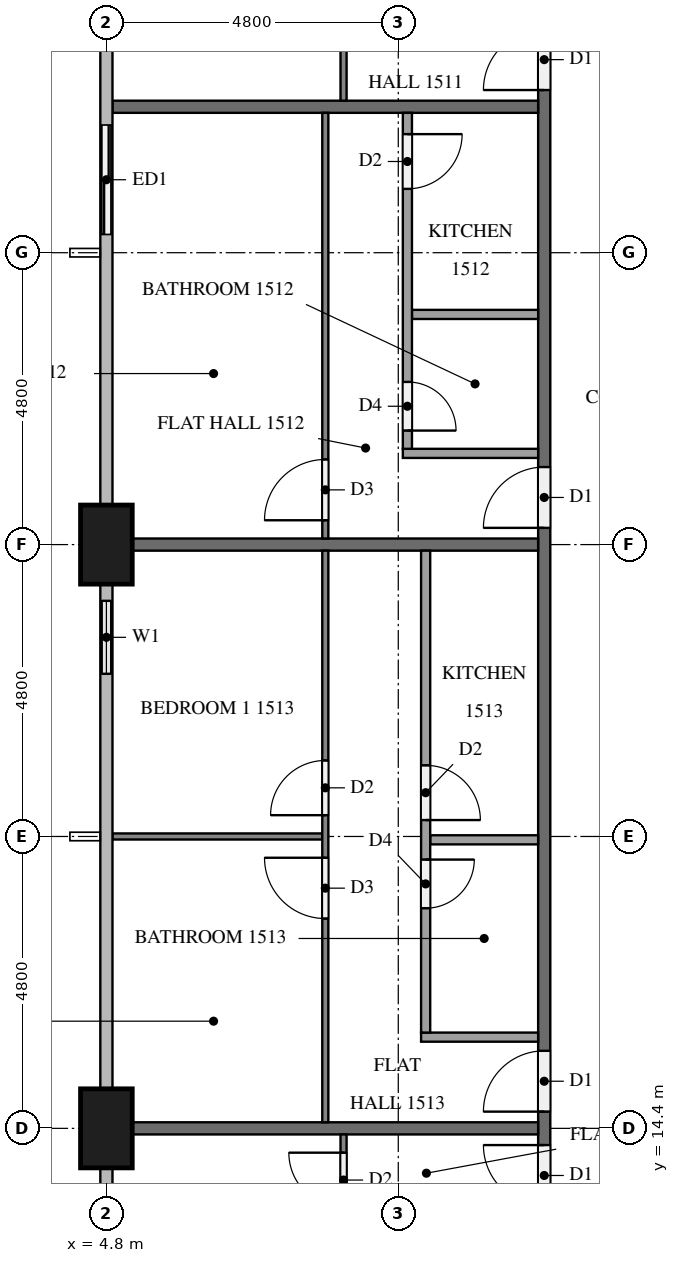
"""IFC4 building model, lengths in metres.
Left out: names, types, materials, properties, quantities, classifications, styles, units other than length and angle.
Written with IfcOpenShell. Run it as: python <this file> out.ifc"""

import sys

from ifc_helpers import new_model, si_unit, direction, frame, frame_2d, origin, origin_2d, place, context, subcontext, project, spatial, rectangle, extrude, element, fill, save


model = new_model("IFC4")
c1 = context("Model", 3, precision=1e-05, world=origin(), true_north=direction((0.0, 1.0)))
c2 = subcontext(c1, "Body", "Model", "MODEL_VIEW")
j1 = project(units=[si_unit("LENGTHUNIT", "METRE"), si_unit("PLANEANGLEUNIT", "RADIAN")], contexts=[c1])
p1 = place(None, origin())
s1 = spatial("IfcSite", under=j1, at=p1, CompositionType="ELEMENT")
p2 = place(p1, origin())
s2 = spatial("IfcBuilding", under=s1, at=p2, CompositionType="ELEMENT")
p3 = place(p2, frame((0.0, 0.0, 62.8)))
s3 = spatial("IfcBuildingStorey", under=s2, at=p3, CompositionType="ELEMENT", Elevation=62.8)
for number, where, z_axis, x_axis in (
    (1, (4.8, 24.0, 0.0), (0.0, 0.0, 1.0), (0.0, 1.0, 0.0)),
    (2, (4.8, 14.4, 0.0), (0.0, 0.0, 1.0), (0.0, 1.0, 0.0)),
):
    element("IfcColumn", number, at=place(p3, frame(where, z_axis=z_axis, x_axis=x_axis)), inside=s3, PredefinedType="COLUMN", context=c2, shape_type="SweptSolid", body=[
        extrude(rectangle(XDim=1.3, YDim=0.85, at=origin_2d()), origin(), (0.0, 0.0, 1.0), 3.2),
    ])
p4 = place(p3, frame((4.8, 31.2, 0.0), z_axis=(0.0, 0.0, 1.0), x_axis=(0.0, -1.0, 0.0)))
e3 = element("IfcWall", 3, at=p4, inside=s3, PredefinedType="SOLIDWALL", context=c2, shape_type="SweptSolid", body=[
    extrude(rectangle(XDim=2.4, YDim=0.15, at=frame_2d((1.2, 0.0))), origin(), (0.0, 0.0, 1.0), 3.2),
])
p5 = place(p4, frame((0.3, 0.0, 0.0)))
e4 = element("IfcOpeningElement", 4, at=p5, cuts=e3, PredefinedType="OPENING", context=c2, shape_type="SweptSolid", body=[
    extrude(rectangle(XDim=1.8, YDim=2.4, at=frame_2d((0.9, 1.2))), frame((0.0, 0.085, 0.0), z_axis=(0.0, -1.0, 0.0), x_axis=(1.0, 0.0, 0.0)), (0.0, 0.0, 1.0), 0.17),
])
p6 = place(p3, frame((4.8, 23.35, 0.0), z_axis=(0.0, 0.0, 1.0), x_axis=(0.0, -1.0, 0.0)))
e5 = element("IfcWall", 5, at=p6, inside=s3, PredefinedType="SOLIDWALL", context=c2, shape_type="SweptSolid", body=[
    extrude(rectangle(XDim=1.75, YDim=0.15, at=frame_2d((0.875, 0.0))), origin(), (0.0, 0.0, 1.0), 3.2),
])
p7 = place(p6, frame((0.275, 0.0, 0.9)))
e6 = element("IfcOpeningElement", 6, at=p7, cuts=e5, PredefinedType="OPENING", context=c2, shape_type="SweptSolid", body=[
    extrude(rectangle(XDim=1.2, YDim=1.4, at=frame_2d((0.6, 0.7))), frame((0.0, 0.085, 0.0), z_axis=(0.0, -1.0, 0.0), x_axis=(1.0, 0.0, 0.0)), (0.0, 0.0, 1.0), 0.17),
])
p8 = place(p3, frame((4.8, 13.75, 0.0), z_axis=(0.0, 0.0, 1.0), x_axis=(0.0, -1.0, 0.0)))
e7 = element("IfcWall", 7, at=p8, inside=s3, PredefinedType="SOLIDWALL", context=c2, shape_type="SweptSolid", body=[
    extrude(rectangle(XDim=1.75, YDim=0.15, at=frame_2d((0.875, 0.0))), origin(), (0.0, 0.0, 1.0), 3.2),
])
p9 = place(p8, frame((0.275, 0.0, 0.9)))
e8 = element("IfcOpeningElement", 8, at=p9, cuts=e7, PredefinedType="OPENING", context=c2, shape_type="SweptSolid", body=[
    extrude(rectangle(XDim=1.2, YDim=1.4, at=frame_2d((0.6, 0.7))), frame((0.0, 0.085, 0.0), z_axis=(0.0, -1.0, 0.0), x_axis=(1.0, 0.0, 0.0)), (0.0, 0.0, 1.0), 0.17),
])
p10 = place(p3, frame((12.0, 12.1, 0.0), z_axis=(0.0, 0.0, 1.0), x_axis=(0.0, 1.0, 0.0)))
e9 = element("IfcWall", 9, at=p10, inside=s3, PredefinedType="PARTITIONING", context=c2, shape_type="SweptSolid", body=[
    extrude(rectangle(XDim=28.6, YDim=0.2, at=frame_2d((14.3, 0.0))), origin(), (0.0, 0.0, 1.0), 3.2),
])
p11 = place(p10, frame((19.375, 0.0, 0.0)))
e10 = element("IfcOpeningElement", 10, at=p11, cuts=e9, PredefinedType="OPENING", context=c2, shape_type="SweptSolid", body=[
    extrude(rectangle(XDim=1.0, YDim=2.1, at=frame_2d((0.5, 1.05))), frame((0.0, 0.11, 0.0), z_axis=(0.0, -1.0, 0.0), x_axis=(1.0, 0.0, 0.0)), (0.0, 0.0, 1.0), 0.22),
])
p12 = place(p10, frame((12.175, 0.0, 0.0)))
e11 = element("IfcOpeningElement", 11, at=p12, cuts=e9, PredefinedType="OPENING", context=c2, shape_type="SweptSolid", body=[
    extrude(rectangle(XDim=1.0, YDim=2.1, at=frame_2d((0.5, 1.05))), frame((0.0, 0.11, 0.0), z_axis=(0.0, -1.0, 0.0), x_axis=(1.0, 0.0, 0.0)), (0.0, 0.0, 1.0), 0.22),
])
p13 = place(p10, frame((2.575, 0.0, 0.0)))
e12 = element("IfcOpeningElement", 12, at=p13, cuts=e9, PredefinedType="OPENING", context=c2, shape_type="SweptSolid", body=[
    extrude(rectangle(XDim=1.0, YDim=2.1, at=frame_2d((0.5, 1.05))), frame((0.0, 0.11, 0.0), z_axis=(0.0, -1.0, 0.0), x_axis=(1.0, 0.0, 0.0)), (0.0, 0.0, 1.0), 0.22),
])
p14 = place(p10, frame((1.025, 0.0, 0.0)))
e13 = element("IfcOpeningElement", 13, at=p14, cuts=e9, PredefinedType="OPENING", context=c2, shape_type="SweptSolid", body=[
    extrude(rectangle(XDim=1.0, YDim=2.1, at=frame_2d((0.5, 1.05))), frame((0.0, 0.11, 0.0), z_axis=(0.0, -1.0, 0.0), x_axis=(1.0, 0.0, 0.0)), (0.0, 0.0, 1.0), 0.22),
])
p15 = place(p3, frame((4.9, 31.2, 0.0), z_axis=(0.0, 0.0, 1.0), x_axis=(1.0, 0.0, 0.0)))
e14 = element("IfcWall", 14, at=p15, inside=s3, PredefinedType="PARTITIONING", context=c2, shape_type="SweptSolid", body=[
    extrude(rectangle(XDim=7.0, YDim=0.2, at=frame_2d((3.5, 0.0))), origin(), (0.0, 0.0, 1.0), 3.2),
])
for number, where, z_axis, x_axis in (
    (15, (5.225, 24.0, 0.0), (0.0, 0.0, 1.0), (1.0, 0.0, 0.0)),
    (16, (5.225, 14.4, 0.0), (0.0, 0.0, 1.0), (1.0, 0.0, 0.0)),
):
    element("IfcWall", number, at=place(p3, frame(where, z_axis=z_axis, x_axis=x_axis)), inside=s3, PredefinedType="PARTITIONING", context=c2, shape_type="SweptSolid", body=[
        extrude(rectangle(XDim=6.675, YDim=0.2, at=frame_2d((3.337, 0.0))), origin(), (0.0, 0.0, 1.0), 3.2),
    ])
p16 = place(p3, frame((8.7, 31.3, 0.0), z_axis=(0.0, 0.0, 1.0), x_axis=(0.0, 1.0, 0.0)))
e17 = element("IfcWall", 17, at=p16, inside=s3, PredefinedType="PARTITIONING", context=c2, shape_type="SweptSolid", body=[
    extrude(rectangle(XDim=9.4, YDim=0.1, at=frame_2d((4.7, 0.0))), origin(), (0.0, 0.0, 1.0), 3.2),
])
p17 = place(p16, frame((3.45, 0.0, 0.0)))
e18 = element("IfcOpeningElement", 18, at=p17, cuts=e17, PredefinedType="OPENING", context=c2, shape_type="SweptSolid", body=[
    extrude(rectangle(XDim=0.9, YDim=2.1, at=frame_2d((0.45, 1.05))), frame((0.0, 0.06, 0.0), z_axis=(0.0, -1.0, 0.0), x_axis=(1.0, 0.0, 0.0)), (0.0, 0.0, 1.0), 0.12),
])
p18 = place(p16, frame((5.05, 0.0, 0.0)))
e19 = element("IfcOpeningElement", 19, at=p18, cuts=e17, PredefinedType="OPENING", context=c2, shape_type="SweptSolid", body=[
    extrude(rectangle(XDim=1.0, YDim=2.1, at=frame_2d((0.5, 1.05))), frame((0.0, 0.06, 0.0), z_axis=(0.0, -1.0, 0.0), x_axis=(1.0, 0.0, 0.0)), (0.0, 0.0, 1.0), 0.12),
])
p19 = place(p3, frame((8.4, 24.1, 0.0), z_axis=(0.0, 0.0, 1.0), x_axis=(0.0, 1.0, 0.0)))
e20 = element("IfcWall", 20, at=p19, inside=s3, PredefinedType="PARTITIONING", context=c2, shape_type="SweptSolid", body=[
    extrude(rectangle(XDim=7.0, YDim=0.1, at=frame_2d((3.5, 0.0))), origin(), (0.0, 0.0, 1.0), 3.2),
])
p20 = place(p19, frame((0.3, 0.0, 0.0)))
e21 = element("IfcOpeningElement", 21, at=p20, cuts=e20, PredefinedType="OPENING", context=c2, shape_type="SweptSolid", body=[
    extrude(rectangle(XDim=1.0, YDim=2.1, at=frame_2d((0.5, 1.05))), frame((0.0, 0.06, 0.0), z_axis=(0.0, -1.0, 0.0), x_axis=(1.0, 0.0, 0.0)), (0.0, 0.0, 1.0), 0.12),
])
p21 = place(p3, frame((11.9, 27.785, 0.0), z_axis=(0.0, 0.0, 1.0), x_axis=(-1.0, 0.0, 0.0)))
e22 = element("IfcWall", 22, at=p21, inside=s3, PredefinedType="PARTITIONING", context=c2, shape_type="SweptSolid", body=[
    extrude(rectangle(XDim=2.075, YDim=0.15, at=frame_2d((1.038, 0.0))), origin(), (0.0, 0.0, 1.0), 3.2),
])
p22 = place(p3, frame((11.9, 25.5, 0.0), z_axis=(0.0, 0.0, 1.0), x_axis=(-1.0, 0.0, 0.0)))
e23 = element("IfcWall", 23, at=p22, inside=s3, PredefinedType="PARTITIONING", context=c2, shape_type="SweptSolid", body=[
    extrude(rectangle(XDim=2.225, YDim=0.15, at=frame_2d((1.112, 0.0))), origin(), (0.0, 0.0, 1.0), 3.2),
])
p23 = place(p3, frame((9.75, 31.1, 0.0), z_axis=(0.0, 0.0, 1.0), x_axis=(0.0, -1.0, 0.0)))
e24 = element("IfcWall", 24, at=p23, inside=s3, PredefinedType="PARTITIONING", context=c2, shape_type="SweptSolid", body=[
    extrude(rectangle(XDim=5.525, YDim=0.15, at=frame_2d((2.763, 0.0))), origin(), (0.0, 0.0, 1.0), 3.2),
])
p24 = place(p23, frame((4.425, 0.0, 0.0)))
e25 = element("IfcOpeningElement", 25, at=p24, cuts=e24, PredefinedType="OPENING", context=c2, shape_type="SweptSolid", body=[
    extrude(rectangle(XDim=0.8, YDim=2.1, at=frame_2d((0.4, 1.05))), frame((0.0, 0.085, 0.0), z_axis=(0.0, -1.0, 0.0), x_axis=(1.0, 0.0, 0.0)), (0.0, 0.0, 1.0), 0.17),
])
p25 = place(p23, frame((0.35, 0.0, 0.0)))
e26 = element("IfcOpeningElement", 26, at=p25, cuts=e24, PredefinedType="OPENING", context=c2, shape_type="SweptSolid", body=[
    extrude(rectangle(XDim=0.9, YDim=2.1, at=frame_2d((0.45, 1.05))), frame((0.0, 0.085, 0.0), z_axis=(0.0, -1.0, 0.0), x_axis=(1.0, 0.0, 0.0)), (0.0, 0.0, 1.0), 0.17),
])
p26 = place(p3, frame((8.35, 19.2, 0.0), z_axis=(0.0, 0.0, 1.0), x_axis=(-1.0, 0.0, 0.0)))
e27 = element("IfcWall", 27, at=p26, inside=s3, PredefinedType="PARTITIONING", context=c2, shape_type="SweptSolid", body=[
    extrude(rectangle(XDim=3.45, YDim=0.1, at=frame_2d((1.725, 0.0))), origin(), (0.0, 0.0, 1.0), 3.2),
])
p27 = place(p3, frame((8.4, 14.5, 0.0), z_axis=(0.0, 0.0, 1.0), x_axis=(0.0, 1.0, 0.0)))
e28 = element("IfcWall", 28, at=p27, inside=s3, PredefinedType="PARTITIONING", context=c2, shape_type="SweptSolid", body=[
    extrude(rectangle(XDim=9.4, YDim=0.1, at=frame_2d((4.7, 0.0))), origin(), (0.0, 0.0, 1.0), 3.2),
])
p28 = place(p27, frame((3.35, 0.0, 0.0)))
e29 = element("IfcOpeningElement", 29, at=p28, cuts=e28, PredefinedType="OPENING", context=c2, shape_type="SweptSolid", body=[
    extrude(rectangle(XDim=1.0, YDim=2.1, at=frame_2d((0.5, 1.05))), frame((0.0, 0.06, 0.0), z_axis=(0.0, -1.0, 0.0), x_axis=(1.0, 0.0, 0.0)), (0.0, 0.0, 1.0), 0.12),
])
p29 = place(p27, frame((5.05, 0.0, 0.0)))
e30 = element("IfcOpeningElement", 30, at=p29, cuts=e28, PredefinedType="OPENING", context=c2, shape_type="SweptSolid", body=[
    extrude(rectangle(XDim=0.9, YDim=2.1, at=frame_2d((0.45, 1.05))), frame((0.0, 0.06, 0.0), z_axis=(0.0, -1.0, 0.0), x_axis=(1.0, 0.0, 0.0)), (0.0, 0.0, 1.0), 0.12),
])
p30 = place(p3, frame((11.9, 19.145, 0.0), z_axis=(0.0, 0.0, 1.0), x_axis=(-1.0, 0.0, 0.0)))
e31 = element("IfcWall", 31, at=p30, inside=s3, PredefinedType="PARTITIONING", context=c2, shape_type="SweptSolid", body=[
    extrude(rectangle(XDim=1.775, YDim=0.15, at=frame_2d((0.887, 0.0))), origin(), (0.0, 0.0, 1.0), 3.2),
])
p31 = place(p3, frame((11.9, 15.9, 0.0), z_axis=(0.0, 0.0, 1.0), x_axis=(-1.0, 0.0, 0.0)))
e32 = element("IfcWall", 32, at=p31, inside=s3, PredefinedType="PARTITIONING", context=c2, shape_type="SweptSolid", body=[
    extrude(rectangle(XDim=1.925, YDim=0.15, at=frame_2d((0.962, 0.0))), origin(), (0.0, 0.0, 1.0), 3.2),
])
p32 = place(p3, frame((10.05, 23.9, 0.0), z_axis=(0.0, 0.0, 1.0), x_axis=(0.0, -1.0, 0.0)))
e33 = element("IfcWall", 33, at=p32, inside=s3, PredefinedType="PARTITIONING", context=c2, shape_type="SweptSolid", body=[
    extrude(rectangle(XDim=7.925, YDim=0.15, at=frame_2d((3.962, 0.0))), origin(), (0.0, 0.0, 1.0), 3.2),
])
p33 = place(p32, frame((5.08, 0.0, 0.0)))
e34 = element("IfcOpeningElement", 34, at=p33, cuts=e33, PredefinedType="OPENING", context=c2, shape_type="SweptSolid", body=[
    extrude(rectangle(XDim=0.8, YDim=2.1, at=frame_2d((0.4, 1.05))), frame((0.0, 0.085, 0.0), z_axis=(0.0, -1.0, 0.0), x_axis=(1.0, 0.0, 0.0)), (0.0, 0.0, 1.0), 0.17),
])
p34 = place(p32, frame((3.53, 0.0, 0.0)))
e35 = element("IfcOpeningElement", 35, at=p34, cuts=e33, PredefinedType="OPENING", context=c2, shape_type="SweptSolid", body=[
    extrude(rectangle(XDim=0.9, YDim=2.1, at=frame_2d((0.45, 1.05))), frame((0.0, 0.085, 0.0), z_axis=(0.0, -1.0, 0.0), x_axis=(1.0, 0.0, 0.0)), (0.0, 0.0, 1.0), 0.17),
])
p35 = place(p3, frame((8.7, 0.341, 0.0), z_axis=(0.0, 0.0, 1.0), x_axis=(0.0, 1.0, 0.0)))
e36 = element("IfcWall", 36, at=p35, inside=s3, PredefinedType="PARTITIONING", context=c2, shape_type="SweptSolid", body=[
    extrude(rectangle(XDim=13.959, YDim=0.1, at=frame_2d((6.979, 0.0))), origin(), (0.0, 0.0, 1.0), 3.2),
])
p36 = place(p35, frame((12.759, 0.0, 0.0)))
e37 = element("IfcOpeningElement", 37, at=p36, cuts=e36, PredefinedType="OPENING", context=c2, shape_type="SweptSolid", body=[
    extrude(rectangle(XDim=0.9, YDim=2.1, at=frame_2d((0.45, 1.05))), frame((0.0, 0.06, 0.0), z_axis=(0.0, -1.0, 0.0), x_axis=(1.0, 0.0, 0.0)), (0.0, 0.0, 1.0), 0.12),
])
p37 = place(p35, frame((4.809, 0.0, 0.0)))
e38 = element("IfcOpeningElement", 38, at=p37, cuts=e36, PredefinedType="OPENING", context=c2, shape_type="SweptSolid", body=[
    extrude(rectangle(XDim=1.0, YDim=2.1, at=frame_2d((0.5, 1.05))), frame((0.0, 0.06, 0.0), z_axis=(0.0, -1.0, 0.0), x_axis=(1.0, 0.0, 0.0)), (0.0, 0.0, 1.0), 0.12),
])
p38 = place(p35, frame((3.209, 0.0, 0.0)))
e39 = element("IfcOpeningElement", 39, at=p38, cuts=e36, PredefinedType="OPENING", context=c2, shape_type="SweptSolid", body=[
    extrude(rectangle(XDim=0.9, YDim=2.1, at=frame_2d((0.45, 1.05))), frame((0.0, 0.06, 0.0), z_axis=(0.0, -1.0, 0.0), x_axis=(1.0, 0.0, 0.0)), (0.0, 0.0, 1.0), 0.12),
])
p39 = place(p5, origin())
e40 = element("IfcDoor", 40, at=p39, inside=s3, OperationType="SLIDING_TO_LEFT", PredefinedType="DOOR", context=c2, shape_type="SweptSolid", body=[
    extrude(rectangle(XDim=1.8, YDim=2.4, at=frame_2d((0.9, 1.2))), frame((0.0, 0.025, 0.0), z_axis=(0.0, -1.0, 0.0), x_axis=(1.0, 0.0, 0.0)), (0.0, 0.0, 1.0), 0.05),
])
fill(e4, e40)
p40 = place(p7, origin())
e41 = element("IfcWindow", 41, at=p40, inside=s3, PartitioningType="SINGLE_PANEL", PredefinedType="WINDOW", context=c2, shape_type="SweptSolid", body=[
    extrude(rectangle(XDim=1.2, YDim=1.4, at=frame_2d((0.6, 0.7))), frame((0.0, 0.03, 0.0), z_axis=(0.0, -1.0, 0.0), x_axis=(1.0, 0.0, 0.0)), (0.0, 0.0, 1.0), 0.06),
])
fill(e6, e41)
p41 = place(p11, origin())
e42 = element("IfcDoor", 42, at=p41, inside=s3, OperationType="SINGLE_SWING_LEFT", PredefinedType="DOOR", context=c2, shape_type="SweptSolid", body=[
    extrude(rectangle(XDim=1.0, YDim=2.1, at=frame_2d((0.5, 1.05))), frame((0.0, 0.025, 0.0), z_axis=(0.0, -1.0, 0.0), x_axis=(1.0, 0.0, 0.0)), (0.0, 0.0, 1.0), 0.05),
])
fill(e10, e42)
p42 = place(p12, origin())
e43 = element("IfcDoor", 43, at=p42, inside=s3, OperationType="SINGLE_SWING_LEFT", PredefinedType="DOOR", context=c2, shape_type="SweptSolid", body=[
    extrude(rectangle(XDim=1.0, YDim=2.1, at=frame_2d((0.5, 1.05))), frame((0.0, 0.025, 0.0), z_axis=(0.0, -1.0, 0.0), x_axis=(1.0, 0.0, 0.0)), (0.0, 0.0, 1.0), 0.05),
])
fill(e11, e43)
p43 = place(p13, origin())
e44 = element("IfcDoor", 44, at=p43, inside=s3, OperationType="SINGLE_SWING_LEFT", PredefinedType="DOOR", context=c2, shape_type="SweptSolid", body=[
    extrude(rectangle(XDim=1.0, YDim=2.1, at=frame_2d((0.5, 1.05))), frame((0.0, 0.025, 0.0), z_axis=(0.0, -1.0, 0.0), x_axis=(1.0, 0.0, 0.0)), (0.0, 0.0, 1.0), 0.05),
])
fill(e12, e44)
p44 = place(p14, origin())
e45 = element("IfcDoor", 45, at=p44, inside=s3, OperationType="SINGLE_SWING_RIGHT", PredefinedType="DOOR", context=c2, shape_type="SweptSolid", body=[
    extrude(rectangle(XDim=1.0, YDim=2.1, at=frame_2d((0.5, 1.05))), frame((0.0, 0.025, 0.0), z_axis=(0.0, -1.0, 0.0), x_axis=(1.0, 0.0, 0.0)), (0.0, 0.0, 1.0), 0.05),
])
fill(e13, e45)
p45 = place(p20, origin())
e46 = element("IfcDoor", 46, at=p45, inside=s3, OperationType="SINGLE_SWING_LEFT", PredefinedType="DOOR", context=c2, shape_type="SweptSolid", body=[
    extrude(rectangle(XDim=1.0, YDim=2.1, at=frame_2d((0.5, 1.05))), frame((0.0, 0.025, 0.0), z_axis=(0.0, -1.0, 0.0), x_axis=(1.0, 0.0, 0.0)), (0.0, 0.0, 1.0), 0.05),
])
fill(e21, e46)
p46 = place(p24, origin())
e47 = element("IfcDoor", 47, at=p46, inside=s3, OperationType="SINGLE_SWING_RIGHT", PredefinedType="DOOR", context=c2, shape_type="SweptSolid", body=[
    extrude(rectangle(XDim=0.8, YDim=2.1, at=frame_2d((0.4, 1.05))), frame((0.0, 0.025, 0.0), z_axis=(0.0, -1.0, 0.0), x_axis=(1.0, 0.0, 0.0)), (0.0, 0.0, 1.0), 0.05),
])
fill(e25, e47)
p47 = place(p25, origin())
e48 = element("IfcDoor", 48, at=p47, inside=s3, OperationType="SINGLE_SWING_LEFT", PredefinedType="DOOR", context=c2, shape_type="SweptSolid", body=[
    extrude(rectangle(XDim=0.9, YDim=2.1, at=frame_2d((0.45, 1.05))), frame((0.0, 0.025, 0.0), z_axis=(0.0, -1.0, 0.0), x_axis=(1.0, 0.0, 0.0)), (0.0, 0.0, 1.0), 0.05),
])
fill(e26, e48)
p48 = place(p28, origin())
e49 = element("IfcDoor", 49, at=p48, inside=s3, OperationType="SINGLE_SWING_RIGHT", PredefinedType="DOOR", context=c2, shape_type="SweptSolid", body=[
    extrude(rectangle(XDim=1.0, YDim=2.1, at=frame_2d((0.5, 1.05))), frame((0.0, 0.025, 0.0), z_axis=(0.0, -1.0, 0.0), x_axis=(1.0, 0.0, 0.0)), (0.0, 0.0, 1.0), 0.05),
])
fill(e29, e49)
p49 = place(p29, origin())
e50 = element("IfcDoor", 50, at=p49, inside=s3, OperationType="SINGLE_SWING_LEFT", PredefinedType="DOOR", context=c2, shape_type="SweptSolid", body=[
    extrude(rectangle(XDim=0.9, YDim=2.1, at=frame_2d((0.45, 1.05))), frame((0.0, 0.025, 0.0), z_axis=(0.0, -1.0, 0.0), x_axis=(1.0, 0.0, 0.0)), (0.0, 0.0, 1.0), 0.05),
])
fill(e30, e50)
p50 = place(p33, origin())
e51 = element("IfcDoor", 51, at=p50, inside=s3, OperationType="SINGLE_SWING_LEFT", PredefinedType="DOOR", context=c2, shape_type="SweptSolid", body=[
    extrude(rectangle(XDim=0.8, YDim=2.1, at=frame_2d((0.4, 1.05))), frame((0.0, 0.025, 0.0), z_axis=(0.0, -1.0, 0.0), x_axis=(1.0, 0.0, 0.0)), (0.0, 0.0, 1.0), 0.05),
])
fill(e34, e51)
p51 = place(p34, origin())
e52 = element("IfcDoor", 52, at=p51, inside=s3, OperationType="SINGLE_SWING_RIGHT", PredefinedType="DOOR", context=c2, shape_type="SweptSolid", body=[
    extrude(rectangle(XDim=0.9, YDim=2.1, at=frame_2d((0.45, 1.05))), frame((0.0, 0.025, 0.0), z_axis=(0.0, -1.0, 0.0), x_axis=(1.0, 0.0, 0.0)), (0.0, 0.0, 1.0), 0.05),
])
fill(e35, e52)
p52 = place(p36, origin())
e53 = element("IfcDoor", 53, at=p52, inside=s3, OperationType="SINGLE_SWING_RIGHT", PredefinedType="DOOR", context=c2, shape_type="SweptSolid", body=[
    extrude(rectangle(XDim=0.9, YDim=2.1, at=frame_2d((0.45, 1.05))), frame((0.0, 0.025, 0.0), z_axis=(0.0, -1.0, 0.0), x_axis=(1.0, 0.0, 0.0)), (0.0, 0.0, 1.0), 0.05),
])
fill(e37, e53)
save(model, sys.argv[1])
